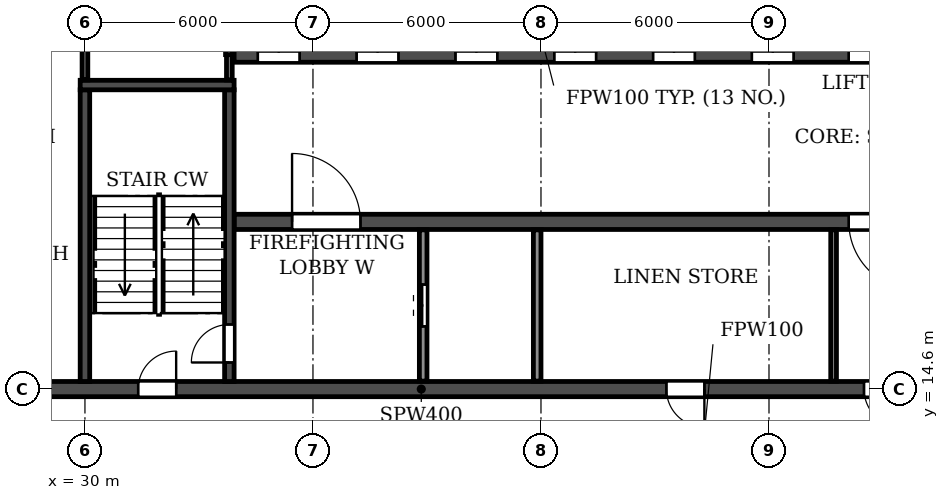
"""IFC4 building model, lengths in metres.
Left out: names, types, materials, properties, quantities, classifications, styles, units other than length and angle.
Written with IfcOpenShell. Run it as: python <this file> out.ifc"""

import sys

from ifc_helpers import new_model, si_unit, direction, frame, frame_2d, origin, place, context, subcontext, project, spatial, rectangle, extrude, element, fill, save


model = new_model("IFC4")
c1 = context("Model", 3, precision=1e-05, world=origin(), true_north=direction((0.0, 1.0)))
c2 = subcontext(c1, "Body", "Model", "MODEL_VIEW")
j1 = project(units=[si_unit("LENGTHUNIT", "METRE"), si_unit("PLANEANGLEUNIT", "RADIAN")], contexts=[c1])
p1 = place(None, origin())
s1 = spatial("IfcSite", under=j1, at=p1, CompositionType="ELEMENT")
p2 = place(p1, origin())
s2 = spatial("IfcBuilding", under=s1, at=p2, CompositionType="ELEMENT")
p3 = place(p2, frame((0.0, 0.0, 201.6)))
s3 = spatial("IfcBuildingStorey", under=s2, at=p3, CompositionType="ELEMENT", Elevation=201.6)
p4 = place(p3, frame((18.2, 14.6, 0.0), z_axis=(0.0, 0.0, 1.0), x_axis=(1.0, 0.0, 0.0)))
e1 = element("IfcWall", 1, at=p4, inside=s3, PredefinedType="SOLIDWALL", context=c2, shape_type="SweptSolid", body=[
    extrude(rectangle(XDim=65.6, YDim=0.4, at=frame_2d((32.8, 0.0))), origin(), (0.0, 0.0, 1.0), 3.08),
])
p5 = place(p4, frame((0.7, 0.0, 0.0)))
e2 = element("IfcOpeningElement", 2, at=p5, cuts=e1, PredefinedType="OPENING", context=c2, shape_type="SweptSolid", body=[
    extrude(rectangle(XDim=1.0, YDim=2.1, at=frame_2d((0.5, 1.05))), frame((0.0, 0.21, 0.0), z_axis=(0.0, -1.0, 0.0), x_axis=(1.0, 0.0, 0.0)), (0.0, 0.0, 1.0), 0.42),
])
p6 = place(p4, frame((8.6, 0.0, 0.0)))
e3 = element("IfcOpeningElement", 3, at=p6, cuts=e1, PredefinedType="OPENING", context=c2, shape_type="SweptSolid", body=[
    extrude(rectangle(XDim=1.0, YDim=2.1, at=frame_2d((0.5, 1.05))), frame((0.0, 0.21, 0.0), z_axis=(0.0, -1.0, 0.0), x_axis=(1.0, 0.0, 0.0)), (0.0, 0.0, 1.0), 0.42),
])
p7 = place(p4, frame((13.2, 0.0, 0.0)))
e4 = element("IfcOpeningElement", 4, at=p7, cuts=e1, PredefinedType="OPENING", context=c2, shape_type="SweptSolid", body=[
    extrude(rectangle(XDim=1.0, YDim=2.1, at=frame_2d((0.5, 1.05))), frame((0.0, 0.21, 0.0), z_axis=(0.0, -1.0, 0.0), x_axis=(1.0, 0.0, 0.0)), (0.0, 0.0, 1.0), 0.42),
])
p8 = place(p4, frame((27.1, 0.0, 0.0)))
e5 = element("IfcOpeningElement", 5, at=p8, cuts=e1, PredefinedType="OPENING", context=c2, shape_type="SweptSolid", body=[
    extrude(rectangle(XDim=1.0, YDim=2.1, at=frame_2d((0.5, 1.05))), frame((0.0, 0.21, 0.0), z_axis=(0.0, -1.0, 0.0), x_axis=(1.0, 0.0, 0.0)), (0.0, 0.0, 1.0), 0.42),
])
p9 = place(p4, frame((32.3, 0.0, 0.0)))
e6 = element("IfcOpeningElement", 6, at=p9, cuts=e1, PredefinedType="OPENING", context=c2, shape_type="SweptSolid", body=[
    extrude(rectangle(XDim=1.0, YDim=2.1, at=frame_2d((0.5, 1.05))), frame((0.0, 0.21, 0.0), z_axis=(0.0, -1.0, 0.0), x_axis=(1.0, 0.0, 0.0)), (0.0, 0.0, 1.0), 0.42),
])
p10 = place(p4, frame((34.9, 0.0, 0.0)))
e7 = element("IfcOpeningElement", 7, at=p10, cuts=e1, PredefinedType="OPENING", context=c2, shape_type="SweptSolid", body=[
    extrude(rectangle(XDim=1.0, YDim=2.1, at=frame_2d((0.5, 1.05))), frame((0.0, 0.21, 0.0), z_axis=(0.0, -1.0, 0.0), x_axis=(1.0, 0.0, 0.0)), (0.0, 0.0, 1.0), 0.42),
])
p11 = place(p4, frame((38.8, 0.0, 0.0)))
e8 = element("IfcOpeningElement", 8, at=p11, cuts=e1, PredefinedType="OPENING", context=c2, shape_type="SweptSolid", body=[
    extrude(rectangle(XDim=1.0, YDim=2.1, at=frame_2d((0.5, 1.05))), frame((0.0, 0.21, 0.0), z_axis=(0.0, -1.0, 0.0), x_axis=(1.0, 0.0, 0.0)), (0.0, 0.0, 1.0), 0.42),
])
p12 = place(p4, frame((51.4, 0.0, 0.0)))
e9 = element("IfcOpeningElement", 9, at=p12, cuts=e1, PredefinedType="OPENING", context=c2, shape_type="SweptSolid", body=[
    extrude(rectangle(XDim=1.0, YDim=2.1, at=frame_2d((0.5, 1.05))), frame((0.0, 0.21, 0.0), z_axis=(0.0, -1.0, 0.0), x_axis=(1.0, 0.0, 0.0)), (0.0, 0.0, 1.0), 0.42),
])
p13 = place(p4, frame((56.0, 0.0, 0.0)))
e10 = element("IfcOpeningElement", 10, at=p13, cuts=e1, PredefinedType="OPENING", context=c2, shape_type="SweptSolid", body=[
    extrude(rectangle(XDim=1.0, YDim=2.1, at=frame_2d((0.5, 1.05))), frame((0.0, 0.21, 0.0), z_axis=(0.0, -1.0, 0.0), x_axis=(1.0, 0.0, 0.0)), (0.0, 0.0, 1.0), 0.42),
])
p14 = place(p4, frame((63.9, 0.0, 0.0)))
e11 = element("IfcOpeningElement", 11, at=p14, cuts=e1, PredefinedType="OPENING", context=c2, shape_type="SweptSolid", body=[
    extrude(rectangle(XDim=1.0, YDim=2.1, at=frame_2d((0.5, 1.05))), frame((0.0, 0.21, 0.0), z_axis=(0.0, -1.0, 0.0), x_axis=(1.0, 0.0, 0.0)), (0.0, 0.0, 1.0), 0.42),
])
p15 = place(p3, frame((33.925, 19.0, 0.0), z_axis=(0.0, 0.0, 1.0), x_axis=(1.0, 0.0, 0.0)))
e12 = element("IfcWall", 12, at=p15, inside=s3, PredefinedType="SOLIDWALL", context=c2, shape_type="SweptSolid", body=[
    extrude(rectangle(XDim=34.15, YDim=0.4, at=frame_2d((17.075, 0.0))), origin(), (0.0, 0.0, 1.0), 3.08),
])
p16 = place(p15, frame((16.175, 0.0, 0.0)))
e13 = element("IfcOpeningElement", 13, at=p16, cuts=e12, PredefinedType="OPENING", context=c2, shape_type="SweptSolid", body=[
    extrude(rectangle(XDim=1.8, YDim=2.1, at=frame_2d((0.9, 1.05))), frame((0.0, 0.21, 0.0), z_axis=(0.0, -1.0, 0.0), x_axis=(1.0, 0.0, 0.0)), (0.0, 0.0, 1.0), 0.42),
])
p17 = place(p15, frame((1.525, 0.0, 0.0)))
e14 = element("IfcOpeningElement", 14, at=p17, cuts=e12, PredefinedType="OPENING", context=c2, shape_type="SweptSolid", body=[
    extrude(rectangle(XDim=1.8, YDim=2.1, at=frame_2d((0.9, 1.05))), frame((0.0, 0.21, 0.0), z_axis=(0.0, -1.0, 0.0), x_axis=(1.0, 0.0, 0.0)), (0.0, 0.0, 1.0), 0.42),
])
p18 = place(p15, frame((30.825, 0.0, 0.0)))
e15 = element("IfcOpeningElement", 15, at=p18, cuts=e12, PredefinedType="OPENING", context=c2, shape_type="SweptSolid", body=[
    extrude(rectangle(XDim=1.8, YDim=2.1, at=frame_2d((0.9, 1.05))), frame((0.0, 0.21, 0.0), z_axis=(0.0, -1.0, 0.0), x_axis=(1.0, 0.0, 0.0)), (0.0, 0.0, 1.0), 0.42),
])
p19 = place(p3, frame((33.925, 23.4, 0.0), z_axis=(0.0, 0.0, 1.0), x_axis=(1.0, 0.0, 0.0)))
e16 = element("IfcWall", 16, at=p19, inside=s3, PredefinedType="SOLIDWALL", context=c2, shape_type="SweptSolid", body=[
    extrude(rectangle(XDim=34.15, YDim=0.4, at=frame_2d((17.075, 0.0))), origin(), (0.0, 0.0, 1.0), 3.08),
])
p20 = place(p19, frame((16.175, 0.0, 0.0)))
e17 = element("IfcOpeningElement", 17, at=p20, cuts=e16, PredefinedType="OPENING", context=c2, shape_type="SweptSolid", body=[
    extrude(rectangle(XDim=1.8, YDim=2.1, at=frame_2d((0.9, 1.05))), frame((0.0, 0.21, 0.0), z_axis=(0.0, -1.0, 0.0), x_axis=(1.0, 0.0, 0.0)), (0.0, 0.0, 1.0), 0.42),
])
p21 = place(p19, frame((0.625, 0.0, 0.0)))
e18 = element("IfcOpeningElement", 18, at=p21, cuts=e16, PredefinedType="OPENING", context=c2, shape_type="SweptSolid", body=[
    extrude(rectangle(XDim=1.1, YDim=2.1, at=frame_2d((0.55, 1.05))), frame((0.0, 0.21, 0.0), z_axis=(0.0, -1.0, 0.0), x_axis=(1.0, 0.0, 0.0)), (0.0, 0.0, 1.0), 0.42),
])
p22 = place(p19, frame((3.225, 0.0, 0.0)))
e19 = element("IfcOpeningElement", 19, at=p22, cuts=e16, PredefinedType="OPENING", context=c2, shape_type="SweptSolid", body=[
    extrude(rectangle(XDim=1.1, YDim=2.1, at=frame_2d((0.55, 1.05))), frame((0.0, 0.21, 0.0), z_axis=(0.0, -1.0, 0.0), x_axis=(1.0, 0.0, 0.0)), (0.0, 0.0, 1.0), 0.42),
])
p23 = place(p19, frame((5.825, 0.0, 0.0)))
e20 = element("IfcOpeningElement", 20, at=p23, cuts=e16, PredefinedType="OPENING", context=c2, shape_type="SweptSolid", body=[
    extrude(rectangle(XDim=1.1, YDim=2.1, at=frame_2d((0.55, 1.05))), frame((0.0, 0.21, 0.0), z_axis=(0.0, -1.0, 0.0), x_axis=(1.0, 0.0, 0.0)), (0.0, 0.0, 1.0), 0.42),
])
p24 = place(p19, frame((8.425, 0.0, 0.0)))
e21 = element("IfcOpeningElement", 21, at=p24, cuts=e16, PredefinedType="OPENING", context=c2, shape_type="SweptSolid", body=[
    extrude(rectangle(XDim=1.1, YDim=2.1, at=frame_2d((0.55, 1.05))), frame((0.0, 0.21, 0.0), z_axis=(0.0, -1.0, 0.0), x_axis=(1.0, 0.0, 0.0)), (0.0, 0.0, 1.0), 0.42),
])
p25 = place(p19, frame((11.025, 0.0, 0.0)))
e22 = element("IfcOpeningElement", 22, at=p25, cuts=e16, PredefinedType="OPENING", context=c2, shape_type="SweptSolid", body=[
    extrude(rectangle(XDim=1.1, YDim=2.1, at=frame_2d((0.55, 1.05))), frame((0.0, 0.21, 0.0), z_axis=(0.0, -1.0, 0.0), x_axis=(1.0, 0.0, 0.0)), (0.0, 0.0, 1.0), 0.42),
])
p26 = place(p19, frame((13.625, 0.0, 0.0)))
e23 = element("IfcOpeningElement", 23, at=p26, cuts=e16, PredefinedType="OPENING", context=c2, shape_type="SweptSolid", body=[
    extrude(rectangle(XDim=1.1, YDim=2.1, at=frame_2d((0.55, 1.05))), frame((0.0, 0.21, 0.0), z_axis=(0.0, -1.0, 0.0), x_axis=(1.0, 0.0, 0.0)), (0.0, 0.0, 1.0), 0.42),
])
p27 = place(p19, frame((27.225, 0.0, 0.0)))
e24 = element("IfcOpeningElement", 24, at=p27, cuts=e16, PredefinedType="OPENING", context=c2, shape_type="SweptSolid", body=[
    extrude(rectangle(XDim=1.1, YDim=2.1, at=frame_2d((0.55, 1.05))), frame((0.0, 0.21, 0.0), z_axis=(0.0, -1.0, 0.0), x_axis=(1.0, 0.0, 0.0)), (0.0, 0.0, 1.0), 0.42),
])
p28 = place(p3, frame((30.0, 14.8, 0.0), z_axis=(0.0, 0.0, 1.0), x_axis=(0.0, 1.0, 0.0)))
e25 = element("IfcWall", 25, at=p28, inside=s3, PredefinedType="SOLIDWALL", context=c2, shape_type="SweptSolid", body=[
    extrude(rectangle(XDim=7.675, YDim=0.25, at=frame_2d((3.837, 0.0))), origin(), (0.0, 0.0, 1.0), 3.08),
])
p29 = place(p3, frame((33.8, 14.8, 0.0), z_axis=(0.0, 0.0, 1.0), x_axis=(0.0, 1.0, 0.0)))
e26 = element("IfcWall", 26, at=p29, inside=s3, PredefinedType="SOLIDWALL", context=c2, shape_type="SweptSolid", body=[
    extrude(rectangle(XDim=7.675, YDim=0.25, at=frame_2d((3.837, 0.0))), origin(), (0.0, 0.0, 1.0), 3.08),
])
p30 = place(p29, frame((0.5, 0.0, 0.0)))
e27 = element("IfcOpeningElement", 27, at=p30, cuts=e26, PredefinedType="OPENING", context=c2, shape_type="SweptSolid", body=[
    extrude(rectangle(XDim=1.0, YDim=2.1, at=frame_2d((0.5, 1.05))), frame((0.0, 0.135, 0.0), z_axis=(0.0, -1.0, 0.0), x_axis=(1.0, 0.0, 0.0)), (0.0, 0.0, 1.0), 0.27),
])
p31 = place(p3, frame((29.875, 22.6, 0.0), z_axis=(0.0, 0.0, 1.0), x_axis=(1.0, 0.0, 0.0)))
e28 = element("IfcWall", 28, at=p31, inside=s3, PredefinedType="SOLIDWALL", context=c2, shape_type="SweptSolid", body=[
    extrude(rectangle(XDim=4.05, YDim=0.25, at=frame_2d((2.025, 0.0))), origin(), (0.0, 0.0, 1.0), 3.08),
])
p32 = place(p3, frame((49.7, 14.81, 0.0), z_axis=(0.0, 0.0, 1.0), x_axis=(0.0, 1.0, 0.0)))
e29 = element("IfcWall", 29, at=p32, inside=s3, PredefinedType="PARTITIONING", context=c2, shape_type="SweptSolid", body=[
    extrude(rectangle(XDim=3.98, YDim=0.15, at=frame_2d((1.99, 0.0))), origin(), (0.0, 0.0, 1.0), 3.08),
])
p33 = place(p3, frame((30.0, 22.735, 0.0), z_axis=(0.0, 0.0, 1.0), x_axis=(0.0, 1.0, 0.0)))
e30 = element("IfcWall", 30, at=p33, inside=s3, PredefinedType="PARTITIONING", context=c2, shape_type="SweptSolid", body=[
    extrude(rectangle(XDim=4.855, YDim=0.15, at=frame_2d((2.427, 0.0))), origin(), (0.0, 0.0, 1.0), 3.08),
])
p34 = place(p3, frame((33.8, 22.735, 0.0), z_axis=(0.0, 0.0, 1.0), x_axis=(0.0, 1.0, 0.0)))
e31 = element("IfcWall", 31, at=p34, inside=s3, PredefinedType="PARTITIONING", context=c2, shape_type="SweptSolid", body=[
    extrude(rectangle(XDim=0.665, YDim=0.15, at=frame_2d((0.333, 0.0))), origin(), (0.0, 0.0, 1.0), 3.08),
])
p35 = place(p3, frame((33.8, 23.4, 0.0), z_axis=(0.0, 0.0, 1.0), x_axis=(0.0, 1.0, 0.0)))
e32 = element("IfcWall", 32, at=p35, inside=s3, PredefinedType="PARTITIONING", context=c2, shape_type="SweptSolid", body=[
    extrude(rectangle(XDim=2.7, YDim=0.2, at=frame_2d((1.35, 0.0))), origin(), (0.0, 0.0, 1.0), 3.08),
])
p36 = place(p3, frame((38.9, 14.81, 0.0), z_axis=(0.0, 0.0, 1.0), x_axis=(0.0, 1.0, 0.0)))
e33 = element("IfcWall", 33, at=p36, inside=s3, PredefinedType="PARTITIONING", context=c2, shape_type="SweptSolid", body=[
    extrude(rectangle(XDim=3.98, YDim=0.2, at=frame_2d((1.99, 0.0))), origin(), (0.0, 0.0, 1.0), 3.08),
])
p37 = place(p36, frame((1.44, 0.0, 0.0)))
e34 = element("IfcOpeningElement", 34, at=p37, cuts=e33, PredefinedType="OPENING", context=c2, shape_type="SweptSolid", body=[
    extrude(rectangle(XDim=1.1, YDim=2.1, at=frame_2d((0.55, 1.05))), frame((0.0, 0.11, 0.0), z_axis=(0.0, -1.0, 0.0), x_axis=(1.0, 0.0, 0.0)), (0.0, 0.0, 1.0), 0.22),
])
p38 = place(p3, frame((41.9, 14.81, 0.0), z_axis=(0.0, 0.0, 1.0), x_axis=(0.0, 1.0, 0.0)))
e35 = element("IfcWall", 35, at=p38, inside=s3, PredefinedType="PARTITIONING", context=c2, shape_type="SweptSolid", body=[
    extrude(rectangle(XDim=3.98, YDim=0.2, at=frame_2d((1.99, 0.0))), origin(), (0.0, 0.0, 1.0), 3.08),
])
p39 = place(p7, origin())
e36 = element("IfcDoor", 36, at=p39, inside=s3, OperationType="SINGLE_SWING_RIGHT", PredefinedType="DOOR", context=c2, shape_type="SweptSolid", body=[
    extrude(rectangle(XDim=1.0, YDim=2.1, at=frame_2d((0.5, 1.05))), frame((0.0, 0.025, 0.0), z_axis=(0.0, -1.0, 0.0), x_axis=(1.0, 0.0, 0.0)), (0.0, 0.0, 1.0), 0.05),
])
fill(e4, e36)
p40 = place(p8, frame((1.0, 0.0, 0.0), z_axis=(0.0, 0.0, 1.0), x_axis=(-1.0, 0.0, 0.0)))
e37 = element("IfcDoor", 37, at=p40, inside=s3, OperationType="SINGLE_SWING_LEFT", PredefinedType="DOOR", context=c2, shape_type="SweptSolid", body=[
    extrude(rectangle(XDim=1.0, YDim=2.1, at=frame_2d((0.5, 1.05))), frame((0.0, 0.025, 0.0), z_axis=(0.0, -1.0, 0.0), x_axis=(1.0, 0.0, 0.0)), (0.0, 0.0, 1.0), 0.05),
])
fill(e5, e37)
p41 = place(p9, frame((1.0, 0.0, 0.0), z_axis=(0.0, 0.0, 1.0), x_axis=(-1.0, 0.0, 0.0)))
e38 = element("IfcDoor", 38, at=p41, inside=s3, OperationType="SINGLE_SWING_LEFT", PredefinedType="DOOR", context=c2, shape_type="SweptSolid", body=[
    extrude(rectangle(XDim=1.0, YDim=2.1, at=frame_2d((0.5, 1.05))), frame((0.0, 0.025, 0.0), z_axis=(0.0, -1.0, 0.0), x_axis=(1.0, 0.0, 0.0)), (0.0, 0.0, 1.0), 0.05),
])
fill(e6, e38)
p42 = place(p30, origin())
e39 = element("IfcDoor", 39, at=p42, inside=s3, OperationType="SINGLE_SWING_LEFT", PredefinedType="DOOR", context=c2, shape_type="SweptSolid", body=[
    extrude(rectangle(XDim=1.0, YDim=2.1, at=frame_2d((0.5, 1.05))), frame((0.0, 0.025, 0.0), z_axis=(0.0, -1.0, 0.0), x_axis=(1.0, 0.0, 0.0)), (0.0, 0.0, 1.0), 0.05),
])
fill(e27, e39)
p43 = place(p37, origin())
e40 = element("IfcDoor", 40, at=p43, inside=s3, OperationType="DOUBLE_DOOR_SLIDING", PredefinedType="DOOR", context=c2, shape_type="SweptSolid", body=[
    extrude(rectangle(XDim=1.1, YDim=2.1, at=frame_2d((0.55, 1.05))), frame((0.0, 0.025, 0.0), z_axis=(0.0, -1.0, 0.0), x_axis=(1.0, 0.0, 0.0)), (0.0, 0.0, 1.0), 0.05),
])
fill(e34, e40)
p44 = place(p20, origin())
e41 = element("IfcDoor", 41, at=p44, inside=s3, OperationType="DOUBLE_DOOR_SINGLE_SWING", PredefinedType="DOOR", context=c2, shape_type="SweptSolid", body=[
    extrude(rectangle(XDim=1.8, YDim=2.1, at=frame_2d((0.9, 1.05))), frame((0.0, 0.025, 0.0), z_axis=(0.0, -1.0, 0.0), x_axis=(1.0, 0.0, 0.0)), (0.0, 0.0, 1.0), 0.05),
])
fill(e17, e41)
p45 = place(p16, frame((1.8, 0.0, 0.0), z_axis=(0.0, 0.0, 1.0), x_axis=(-1.0, 0.0, 0.0)))
e42 = element("IfcDoor", 42, at=p45, inside=s3, OperationType="DOUBLE_DOOR_SINGLE_SWING", PredefinedType="DOOR", context=c2, shape_type="SweptSolid", body=[
    extrude(rectangle(XDim=1.8, YDim=2.1, at=frame_2d((0.9, 1.05))), frame((0.0, 0.025, 0.0), z_axis=(0.0, -1.0, 0.0), x_axis=(1.0, 0.0, 0.0)), (0.0, 0.0, 1.0), 0.05),
])
fill(e13, e42)
p46 = place(p21, origin())
e43 = element("IfcDoor", 43, at=p46, inside=s3, OperationType="DOUBLE_DOOR_SLIDING", PredefinedType="DOOR", context=c2, shape_type="SweptSolid", body=[
    extrude(rectangle(XDim=1.1, YDim=2.1, at=frame_2d((0.55, 1.05))), frame((0.0, 0.025, 0.0), z_axis=(0.0, -1.0, 0.0), x_axis=(1.0, 0.0, 0.0)), (0.0, 0.0, 1.0), 0.05),
])
fill(e18, e43)
p47 = place(p17, origin())
e44 = element("IfcDoor", 44, at=p47, inside=s3, OperationType="DOUBLE_DOOR_SINGLE_SWING", PredefinedType="DOOR", context=c2, shape_type="SweptSolid", body=[
    extrude(rectangle(XDim=1.8, YDim=2.1, at=frame_2d((0.9, 1.05))), frame((0.0, 0.025, 0.0), z_axis=(0.0, -1.0, 0.0), x_axis=(1.0, 0.0, 0.0)), (0.0, 0.0, 1.0), 0.05),
])
fill(e14, e44)
p48 = place(p22, origin())
e45 = element("IfcDoor", 45, at=p48, inside=s3, OperationType="DOUBLE_DOOR_SLIDING", PredefinedType="DOOR", context=c2, shape_type="SweptSolid", body=[
    extrude(rectangle(XDim=1.1, YDim=2.1, at=frame_2d((0.55, 1.05))), frame((0.0, 0.025, 0.0), z_axis=(0.0, -1.0, 0.0), x_axis=(1.0, 0.0, 0.0)), (0.0, 0.0, 1.0), 0.05),
])
fill(e19, e45)
p49 = place(p23, origin())
e46 = element("IfcDoor", 46, at=p49, inside=s3, OperationType="DOUBLE_DOOR_SLIDING", PredefinedType="DOOR", context=c2, shape_type="SweptSolid", body=[
    extrude(rectangle(XDim=1.1, YDim=2.1, at=frame_2d((0.55, 1.05))), frame((0.0, 0.025, 0.0), z_axis=(0.0, -1.0, 0.0), x_axis=(1.0, 0.0, 0.0)), (0.0, 0.0, 1.0), 0.05),
])
fill(e20, e46)
p50 = place(p24, origin())
e47 = element("IfcDoor", 47, at=p50, inside=s3, OperationType="DOUBLE_DOOR_SLIDING", PredefinedType="DOOR", context=c2, shape_type="SweptSolid", body=[
    extrude(rectangle(XDim=1.1, YDim=2.1, at=frame_2d((0.55, 1.05))), frame((0.0, 0.025, 0.0), z_axis=(0.0, -1.0, 0.0), x_axis=(1.0, 0.0, 0.0)), (0.0, 0.0, 1.0), 0.05),
])
fill(e21, e47)
p51 = place(p25, origin())
e48 = element("IfcDoor", 48, at=p51, inside=s3, OperationType="DOUBLE_DOOR_SLIDING", PredefinedType="DOOR", context=c2, shape_type="SweptSolid", body=[
    extrude(rectangle(XDim=1.1, YDim=2.1, at=frame_2d((0.55, 1.05))), frame((0.0, 0.025, 0.0), z_axis=(0.0, -1.0, 0.0), x_axis=(1.0, 0.0, 0.0)), (0.0, 0.0, 1.0), 0.05),
])
fill(e22, e48)
p52 = place(p26, origin())
e49 = element("IfcDoor", 49, at=p52, inside=s3, OperationType="DOUBLE_DOOR_SLIDING", PredefinedType="DOOR", context=c2, shape_type="SweptSolid", body=[
    extrude(rectangle(XDim=1.1, YDim=2.1, at=frame_2d((0.55, 1.05))), frame((0.0, 0.025, 0.0), z_axis=(0.0, -1.0, 0.0), x_axis=(1.0, 0.0, 0.0)), (0.0, 0.0, 1.0), 0.05),
])
fill(e23, e49)
save(model, sys.argv[1])
